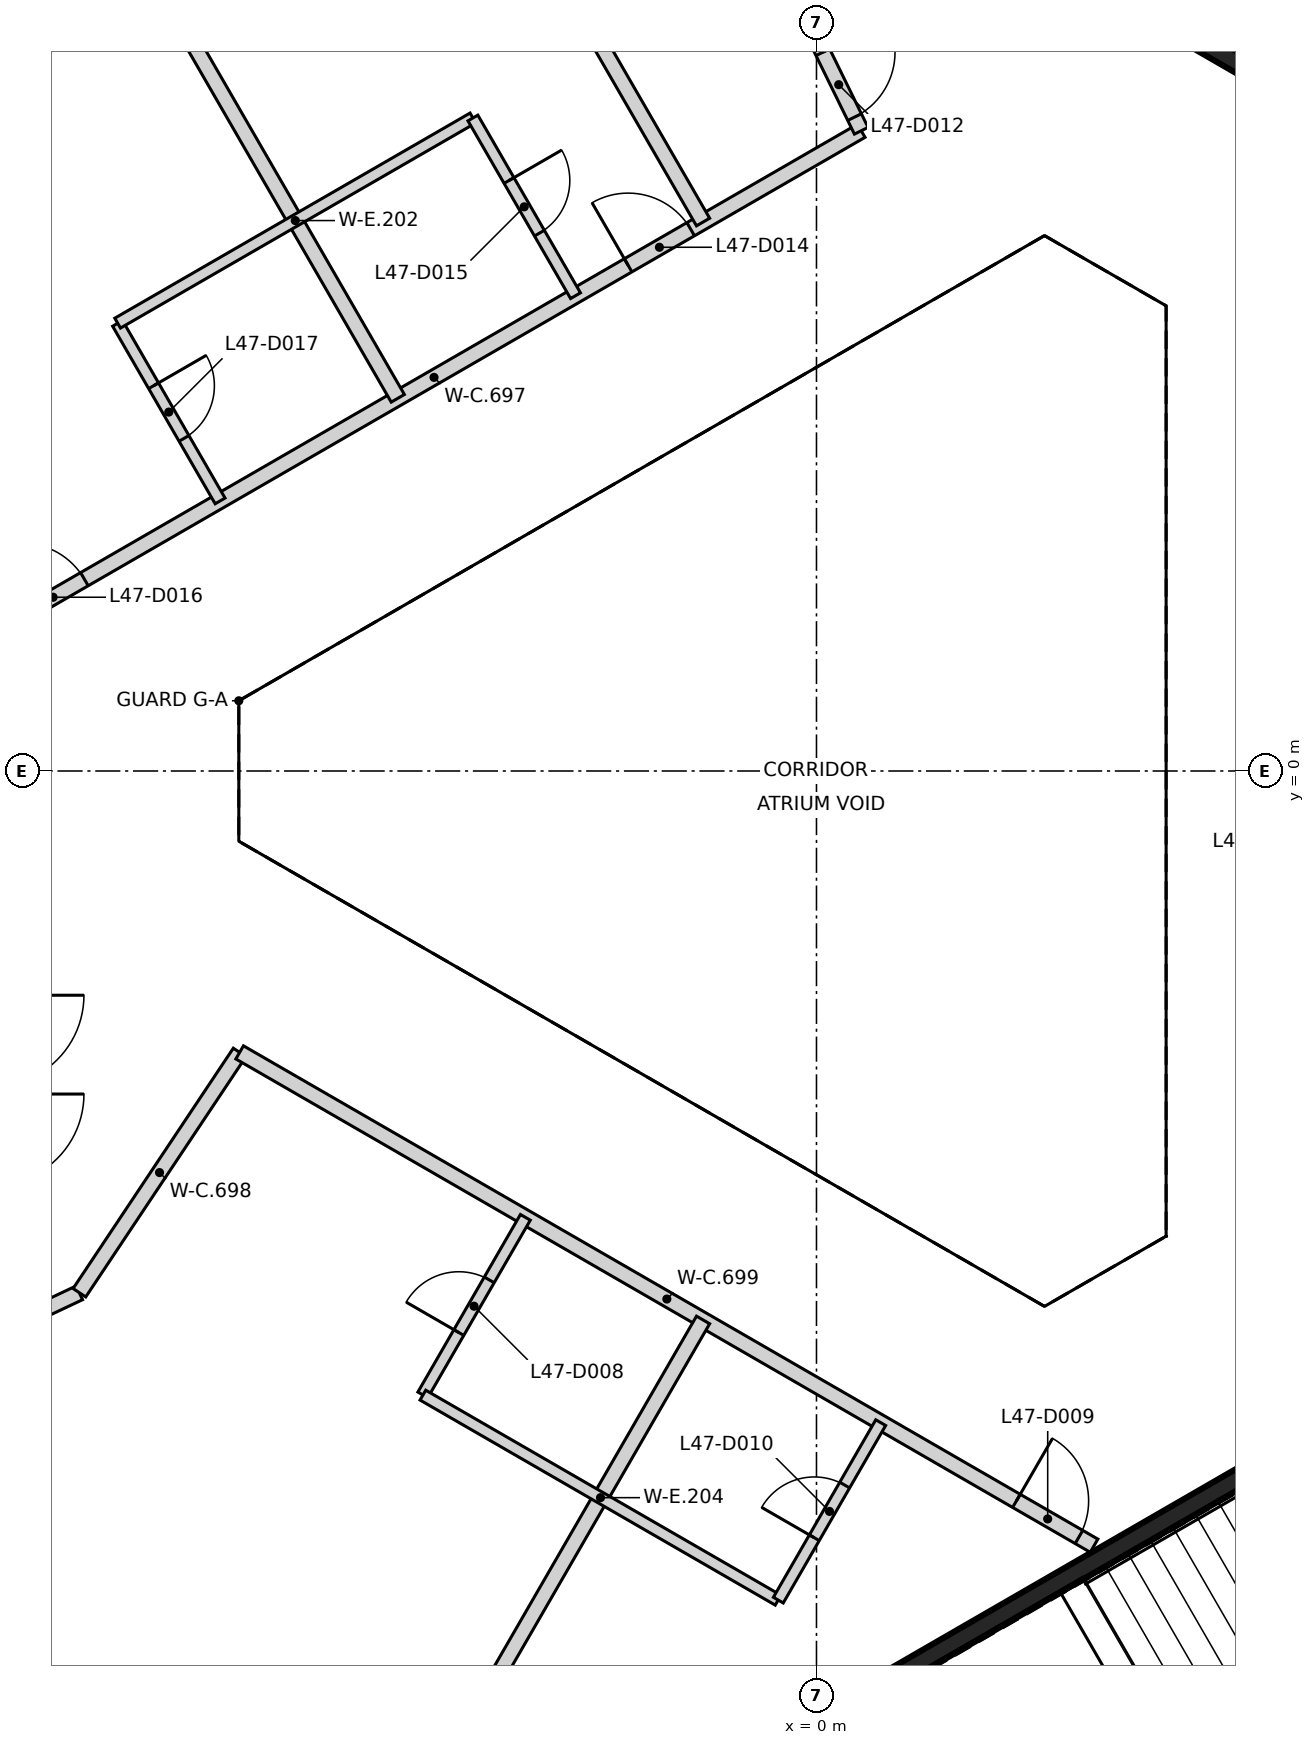
"""IFC4 building model, lengths in metres.
Left out: names, types, materials, properties, quantities, classifications, styles, units other than length and angle.
Written with IfcOpenShell. Run it as: python <this file> out.ifc"""

import sys

from ifc_helpers import new_model, si_unit, direction, frame, frame_2d, origin, place, context, subcontext, project, spatial, rectangle, extrude, element, fill, save


model = new_model("IFC4")
c1 = context("Model", 3, precision=1e-05, world=origin(), true_north=direction((0.0, 1.0)))
c2 = subcontext(c1, "Body", "Model", "MODEL_VIEW")
j1 = project(units=[si_unit("LENGTHUNIT", "METRE"), si_unit("PLANEANGLEUNIT", "RADIAN")], contexts=[c1])
p1 = place(None, origin())
s1 = spatial("IfcSite", under=j1, at=p1, CompositionType="ELEMENT")
p2 = place(p1, origin())
s2 = spatial("IfcBuilding", under=s1, at=p2, CompositionType="ELEMENT")
p3 = place(p2, frame((0.0, 0.0, 190.0)))
s3 = spatial("IfcBuildingStorey", under=s2, at=p3, CompositionType="ELEMENT", Elevation=190.0)
p4 = place(p3, frame((10.42, 6.498, 0.0), z_axis=(0.0, 0.0, 1.0), x_axis=(-0.866021906294, 0.500006057782, 0.0)))
e1 = element("IfcWall", 1, at=p4, inside=s3, PredefinedType="SHEAR", context=c2, shape_type="SweptSolid", body=[
    extrude(rectangle(XDim=11.55, YDim=0.25, at=frame_2d((5.775, 0.0))), origin(), (0.0, 0.0, 1.0), 3.25),
])
p5 = place(p4, frame((10.025, 0.0, 0.0)))
e2 = element("IfcOpeningElement", 2, at=p5, cuts=e1, PredefinedType="OPENING", context=c2, shape_type="SweptSolid", body=[
    extrude(rectangle(XDim=1.2, YDim=2.1, at=frame_2d((0.6, 1.05))), frame((0.0, 0.135, 0.0), z_axis=(0.0, -1.0, 0.0), x_axis=(1.0, 0.0, 0.0)), (0.0, 0.0, 1.0), 0.27),
])
p6 = place(p4, frame((8.725, 0.0, 0.0)))
e3 = element("IfcOpeningElement", 3, at=p6, cuts=e1, PredefinedType="OPENING", context=c2, shape_type="SweptSolid", body=[
    extrude(rectangle(XDim=1.2, YDim=2.1, at=frame_2d((0.6, 1.05))), frame((0.0, 0.135, 0.0), z_axis=(0.0, -1.0, 0.0), x_axis=(1.0, 0.0, 0.0)), (0.0, 0.0, 1.0), 0.27),
])
p7 = place(p3, frame((0.417, -12.273, 0.0), z_axis=(0.0, 0.0, 1.0), x_axis=(0.866021906294, 0.500006057782, 0.0)))
e4 = element("IfcWall", 4, at=p7, inside=s3, PredefinedType="SHEAR", context=c2, shape_type="SweptSolid", body=[
    extrude(rectangle(XDim=11.55, YDim=0.25, at=frame_2d((5.775, 0.0))), origin(), (0.0, 0.0, 1.0), 3.25),
])
p8 = place(p7, frame((10.025, 0.0, 0.0)))
e5 = element("IfcOpeningElement", 5, at=p8, cuts=e4, PredefinedType="OPENING", context=c2, shape_type="SweptSolid", body=[
    extrude(rectangle(XDim=1.2, YDim=2.1, at=frame_2d((0.6, 1.05))), frame((0.0, 0.135, 0.0), z_axis=(0.0, -1.0, 0.0), x_axis=(1.0, 0.0, 0.0)), (0.0, 0.0, 1.0), 0.27),
])
p9 = place(p7, frame((8.725, 0.0, 0.0)))
e6 = element("IfcOpeningElement", 6, at=p9, cuts=e4, PredefinedType="OPENING", context=c2, shape_type="SweptSolid", body=[
    extrude(rectangle(XDim=1.2, YDim=2.1, at=frame_2d((0.6, 1.05))), frame((0.0, 0.135, 0.0), z_axis=(0.0, -1.0, 0.0), x_axis=(1.0, 0.0, 0.0)), (0.0, 0.0, 1.0), 0.27),
])
p10 = place(p3, frame((-10.652, 1.934, 0.0), z_axis=(0.0, 0.0, 1.0), x_axis=(0.866066882415, 0.499928150021, 0.0)))
e7 = element("IfcWall", 7, at=p10, inside=s3, PredefinedType="PARTITIONING", context=c2, shape_type="SweptSolid", body=[
    extrude(rectangle(XDim=12.98, YDim=0.2, at=frame_2d((6.49, 0.0))), origin(), (0.0, 0.0, 1.0), 3.25),
])
p11 = place(p10, frame((9.439, 0.0, 0.0)))
e8 = element("IfcOpeningElement", 8, at=p11, cuts=e7, PredefinedType="OPENING", context=c2, shape_type="SweptSolid", body=[
    extrude(rectangle(XDim=0.95, YDim=2.1, at=frame_2d((0.475, 1.05))), frame((0.0, 0.11, 0.0), z_axis=(0.0, -1.0, 0.0), x_axis=(1.0, 0.0, 0.0)), (0.0, 0.0, 1.0), 0.22),
])
p12 = place(p10, frame((0.229, 0.0, 0.0)))
e9 = element("IfcOpeningElement", 9, at=p12, cuts=e7, PredefinedType="OPENING", context=c2, shape_type="SweptSolid", body=[
    extrude(rectangle(XDim=0.95, YDim=2.1, at=frame_2d((0.475, 1.05))), frame((0.0, 0.11, 0.0), z_axis=(0.0, -1.0, 0.0), x_axis=(1.0, 0.0, 0.0)), (0.0, 0.0, 1.0), 0.22),
])
p13 = place(p3, frame((-10.552, -7.268, 0.0), z_axis=(0.0, 0.0, 1.0), x_axis=(0.904331815333, 0.426830139255, 0.0)))
e10 = element("IfcWall", 10, at=p13, inside=s3, PredefinedType="PARTITIONING", context=c2, shape_type="SweptSolid", body=[
    extrude(rectangle(XDim=0.944, YDim=0.2, at=frame_2d((0.472, 0.0))), origin(), (0.0, 0.0, 1.0), 3.25),
])
p14 = place(p3, frame((-9.697, -6.864, 0.0), z_axis=(0.0, 0.0, 1.0), x_axis=(0.554670545446, 0.832070060761, 0.0)))
e11 = element("IfcWall", 11, at=p14, inside=s3, PredefinedType="PARTITIONING", context=c2, shape_type="SweptSolid", body=[
    extrude(rectangle(XDim=3.8, YDim=0.2, at=frame_2d((1.9, 0.0))), origin(), (0.0, 0.0, 1.0), 3.25),
])
p15 = place(p3, frame((-7.589, -3.702, 0.0), z_axis=(0.0, 0.0, 1.0), x_axis=(0.86602490244, -0.500000868353, 0.0)))
e12 = element("IfcWall", 12, at=p15, inside=s3, PredefinedType="PARTITIONING", context=c2, shape_type="SweptSolid", body=[
    extrude(rectangle(XDim=12.98, YDim=0.2, at=frame_2d((6.49, 0.0))), origin(), (0.0, 0.0, 1.0), 3.25),
])
p16 = place(p15, frame((11.8, 0.0, 0.0)))
e13 = element("IfcOpeningElement", 13, at=p16, cuts=e12, PredefinedType="OPENING", context=c2, shape_type="SweptSolid", body=[
    extrude(rectangle(XDim=0.95, YDim=2.1, at=frame_2d((0.475, 1.05))), frame((0.0, 0.11, 0.0), z_axis=(0.0, -1.0, 0.0), x_axis=(1.0, 0.0, 0.0)), (0.0, 0.0, 1.0), 0.22),
])
p17 = place(p3, frame((-0.964, 11.595, 0.0), z_axis=(0.0, 0.0, 1.0), x_axis=(0.439787800928, -0.898101714816, 0.0)))
e14 = element("IfcWall", 14, at=p17, inside=s3, PredefinedType="PARTITIONING", context=c2, shape_type="SweptSolid", body=[
    extrude(rectangle(XDim=3.532, YDim=0.2, at=frame_2d((1.766, 0.0))), origin(), (0.0, 0.0, 1.0), 3.25),
])
p18 = place(p17, frame((2.382, 0.0, 0.0)))
e15 = element("IfcOpeningElement", 15, at=p18, cuts=e14, PredefinedType="OPENING", context=c2, shape_type="SweptSolid", body=[
    extrude(rectangle(XDim=0.95, YDim=2.1, at=frame_2d((0.475, 1.05))), frame((0.0, 0.11, 0.0), z_axis=(0.0, -1.0, 0.0), x_axis=(1.0, 0.0, 0.0)), (0.0, 0.0, 1.0), 0.22),
])
p19 = place(p3, frame((-12.067, 16.263, 0.0), z_axis=(0.0, 0.0, 1.0), x_axis=(0.500016190239, -0.866016056144, 0.0)))
e16 = element("IfcWall", 16, at=p19, inside=s3, PredefinedType="PARTITIONING", context=c2, shape_type="SweptSolid", body=[
    extrude(rectangle(XDim=13.118, YDim=0.2, at=frame_2d((6.559, 0.0))), origin(), (0.0, 0.0, 1.0), 3.25),
])
for number, where, z_axis, x_axis in (
    (17, (-8.052, 18.582, 0.0), (0.0, 0.0, 1.0), (0.5, -0.866, 0.0)),
    (18, (-8.051, -18.582, 0.0), (0.0, 0.0, 1.0), (0.5, 0.866, 0.0)),
):
    element("IfcWall", number, at=place(p3, frame(where, z_axis=z_axis, x_axis=x_axis)), inside=s3, PredefinedType="PARTITIONING", context=c2, shape_type="SweptSolid", body=[
        extrude(rectangle(XDim=13.118, YDim=0.2, at=frame_2d((6.559, 0.0))), origin(), (0.0, 0.0, 1.0), 3.25),
    ])
p20 = place(p3, frame((-9.195, 5.889, 0.0), z_axis=(0.0, 0.0, 1.0), x_axis=(0.500129820725, -0.865950438779, 0.0)))
e19 = element("IfcWall", 19, at=p20, inside=s3, PredefinedType="PARTITIONING", context=c2, shape_type="SweptSolid", body=[
    extrude(rectangle(XDim=2.698, YDim=0.15, at=frame_2d((1.349, 0.0))), origin(), (0.0, 0.0, 1.0), 3.25),
])
p21 = place(p20, frame((0.948, 0.0, 0.0)))
e20 = element("IfcOpeningElement", 20, at=p21, cuts=e19, PredefinedType="OPENING", context=c2, shape_type="SweptSolid", body=[
    extrude(rectangle(XDim=0.8, YDim=2.1, at=frame_2d((0.4, 1.05))), frame((0.0, 0.085, 0.0), z_axis=(0.0, -1.0, 0.0), x_axis=(1.0, 0.0, 0.0)), (0.0, 0.0, 1.0), 0.17),
])
p22 = place(p3, frame((-9.194, 5.892, 0.0), z_axis=(0.0, 0.0, 1.0), x_axis=(0.8659934935, 0.500055266161, 0.0)))
e21 = element("IfcWall", 21, at=p22, inside=s3, PredefinedType="PARTITIONING", context=c2, shape_type="SweptSolid", body=[
    extrude(rectangle(XDim=5.397, YDim=0.15, at=frame_2d((2.699, 0.0))), origin(), (0.0, 0.0, 1.0), 3.25),
])
p23 = place(p3, frame((-5.179, -8.208, 0.0), z_axis=(0.0, 0.0, 1.0), x_axis=(0.500061949227, 0.865989634427, 0.0)))
e22 = element("IfcWall", 22, at=p23, inside=s3, PredefinedType="PARTITIONING", context=c2, shape_type="SweptSolid", body=[
    extrude(rectangle(XDim=2.698, YDim=0.15, at=frame_2d((1.349, 0.0))), origin(), (0.0, 0.0, 1.0), 3.25),
])
p24 = place(p23, frame((0.948, 0.0, 0.0)))
e23 = element("IfcOpeningElement", 23, at=p24, cuts=e22, PredefinedType="OPENING", context=c2, shape_type="SweptSolid", body=[
    extrude(rectangle(XDim=0.8, YDim=2.1, at=frame_2d((0.4, 1.05))), frame((0.0, 0.085, 0.0), z_axis=(0.0, -1.0, 0.0), x_axis=(1.0, 0.0, 0.0)), (0.0, 0.0, 1.0), 0.17),
])
p25 = place(p3, frame((-5.178, -8.211, 0.0), z_axis=(0.0, 0.0, 1.0), x_axis=(0.866046199912, -0.49996397832, 0.0)))
e24 = element("IfcWall", 24, at=p25, inside=s3, PredefinedType="PARTITIONING", context=c2, shape_type="SweptSolid", body=[
    extrude(rectangle(XDim=5.396, YDim=0.15, at=frame_2d((2.698, 0.0))), origin(), (0.0, 0.0, 1.0), 3.25),
])
p26 = place(p3, frame((-4.52, 8.591, 0.0), z_axis=(0.0, 0.0, 1.0), x_axis=(0.500048589285, -0.86599734893, 0.0)))
e25 = element("IfcWall", 25, at=p26, inside=s3, PredefinedType="PARTITIONING", context=c2, shape_type="SweptSolid", body=[
    extrude(rectangle(XDim=2.7, YDim=0.15, at=frame_2d((1.35, 0.0))), origin(), (0.0, 0.0, 1.0), 3.25),
])
p27 = place(p26, frame((0.95, 0.0, 0.0)))
e26 = element("IfcOpeningElement", 26, at=p27, cuts=e25, PredefinedType="OPENING", context=c2, shape_type="SweptSolid", body=[
    extrude(rectangle(XDim=0.8, YDim=2.1, at=frame_2d((0.4, 1.05))), frame((0.0, 0.085, 0.0), z_axis=(0.0, -1.0, 0.0), x_axis=(1.0, 0.0, 0.0)), (0.0, 0.0, 1.0), 0.17),
])
p28 = place(p3, frame((-0.502, -10.908, 0.0), z_axis=(0.0, 0.0, 1.0), x_axis=(0.499675408556, 0.866212725654, 0.0)))
e27 = element("IfcWall", 27, at=p28, inside=s3, PredefinedType="PARTITIONING", context=c2, shape_type="SweptSolid", body=[
    extrude(rectangle(XDim=2.696, YDim=0.15, at=frame_2d((1.348, 0.0))), origin(), (0.0, 0.0, 1.0), 3.25),
])
p29 = place(p28, frame((0.948, 0.0, 0.0)))
e28 = element("IfcOpeningElement", 28, at=p29, cuts=e27, PredefinedType="OPENING", context=c2, shape_type="SweptSolid", body=[
    extrude(rectangle(XDim=0.8, YDim=2.1, at=frame_2d((0.4, 1.05))), frame((0.0, 0.085, 0.0), z_axis=(0.0, -1.0, 0.0), x_axis=(1.0, 0.0, 0.0)), (0.0, 0.0, 1.0), 0.17),
])
p30 = place(p24, origin())
e29 = element("IfcDoor", 29, at=p30, inside=s3, OperationType="SINGLE_SWING_LEFT", PredefinedType="DOOR", context=c2, shape_type="SweptSolid", body=[
    extrude(rectangle(XDim=0.8, YDim=2.1, at=frame_2d((0.4, 1.05))), frame((0.0, 0.025, 0.0), z_axis=(0.0, -1.0, 0.0), x_axis=(1.0, 0.0, 0.0)), (0.0, 0.0, 1.0), 0.05),
])
fill(e23, e29)
p31 = place(p16, frame((0.95, 0.0, 0.0), z_axis=(0.0, 0.0, 1.0), x_axis=(-1.0, 0.0, 0.0)))
e30 = element("IfcDoor", 30, at=p31, inside=s3, OperationType="SINGLE_SWING_LEFT", PredefinedType="DOOR", context=c2, shape_type="SweptSolid", body=[
    extrude(rectangle(XDim=0.95, YDim=2.1, at=frame_2d((0.475, 1.05))), frame((0.0, 0.025, 0.0), z_axis=(0.0, -1.0, 0.0), x_axis=(1.0, 0.0, 0.0)), (0.0, 0.0, 1.0), 0.05),
])
fill(e13, e30)
p32 = place(p29, frame((0.8, 0.0, 0.0), z_axis=(0.0, 0.0, 1.0), x_axis=(-1.0, 0.0, 0.0)))
e31 = element("IfcDoor", 31, at=p32, inside=s3, OperationType="SINGLE_SWING_LEFT", PredefinedType="DOOR", context=c2, shape_type="SweptSolid", body=[
    extrude(rectangle(XDim=0.8, YDim=2.1, at=frame_2d((0.4, 1.05))), frame((0.0, 0.025, 0.0), z_axis=(0.0, -1.0, 0.0), x_axis=(1.0, 0.0, 0.0)), (0.0, 0.0, 1.0), 0.05),
])
fill(e28, e31)
p33 = place(p18, frame((0.95, 0.0, 0.0), z_axis=(0.0, 0.0, 1.0), x_axis=(-1.0, 0.0, 0.0)))
e32 = element("IfcDoor", 32, at=p33, inside=s3, OperationType="SINGLE_SWING_LEFT", PredefinedType="DOOR", context=c2, shape_type="SweptSolid", body=[
    extrude(rectangle(XDim=0.95, YDim=2.1, at=frame_2d((0.475, 1.05))), frame((0.0, 0.025, 0.0), z_axis=(0.0, -1.0, 0.0), x_axis=(1.0, 0.0, 0.0)), (0.0, 0.0, 1.0), 0.05),
])
fill(e15, e32)
p34 = place(p11, origin())
e33 = element("IfcDoor", 33, at=p34, inside=s3, OperationType="SINGLE_SWING_LEFT", PredefinedType="DOOR", context=c2, shape_type="SweptSolid", body=[
    extrude(rectangle(XDim=0.95, YDim=2.1, at=frame_2d((0.475, 1.05))), frame((0.0, 0.025, 0.0), z_axis=(0.0, -1.0, 0.0), x_axis=(1.0, 0.0, 0.0)), (0.0, 0.0, 1.0), 0.05),
])
fill(e8, e33)
p35 = place(p27, frame((0.8, 0.0, 0.0), z_axis=(0.0, 0.0, 1.0), x_axis=(-1.0, 0.0, 0.0)))
e34 = element("IfcDoor", 34, at=p35, inside=s3, OperationType="SINGLE_SWING_LEFT", PredefinedType="DOOR", context=c2, shape_type="SweptSolid", body=[
    extrude(rectangle(XDim=0.8, YDim=2.1, at=frame_2d((0.4, 1.05))), frame((0.0, 0.025, 0.0), z_axis=(0.0, -1.0, 0.0), x_axis=(1.0, 0.0, 0.0)), (0.0, 0.0, 1.0), 0.05),
])
fill(e26, e34)
p36 = place(p12, origin())
e35 = element("IfcDoor", 35, at=p36, inside=s3, OperationType="SINGLE_SWING_LEFT", PredefinedType="DOOR", context=c2, shape_type="SweptSolid", body=[
    extrude(rectangle(XDim=0.95, YDim=2.1, at=frame_2d((0.475, 1.05))), frame((0.0, 0.025, 0.0), z_axis=(0.0, -1.0, 0.0), x_axis=(1.0, 0.0, 0.0)), (0.0, 0.0, 1.0), 0.05),
])
fill(e9, e35)
p37 = place(p21, frame((0.8, 0.0, 0.0), z_axis=(0.0, 0.0, 1.0), x_axis=(-1.0, 0.0, 0.0)))
e36 = element("IfcDoor", 36, at=p37, inside=s3, OperationType="SINGLE_SWING_LEFT", PredefinedType="DOOR", context=c2, shape_type="SweptSolid", body=[
    extrude(rectangle(XDim=0.8, YDim=2.1, at=frame_2d((0.4, 1.05))), frame((0.0, 0.025, 0.0), z_axis=(0.0, -1.0, 0.0), x_axis=(1.0, 0.0, 0.0)), (0.0, 0.0, 1.0), 0.05),
])
fill(e20, e36)
save(model, sys.argv[1])
